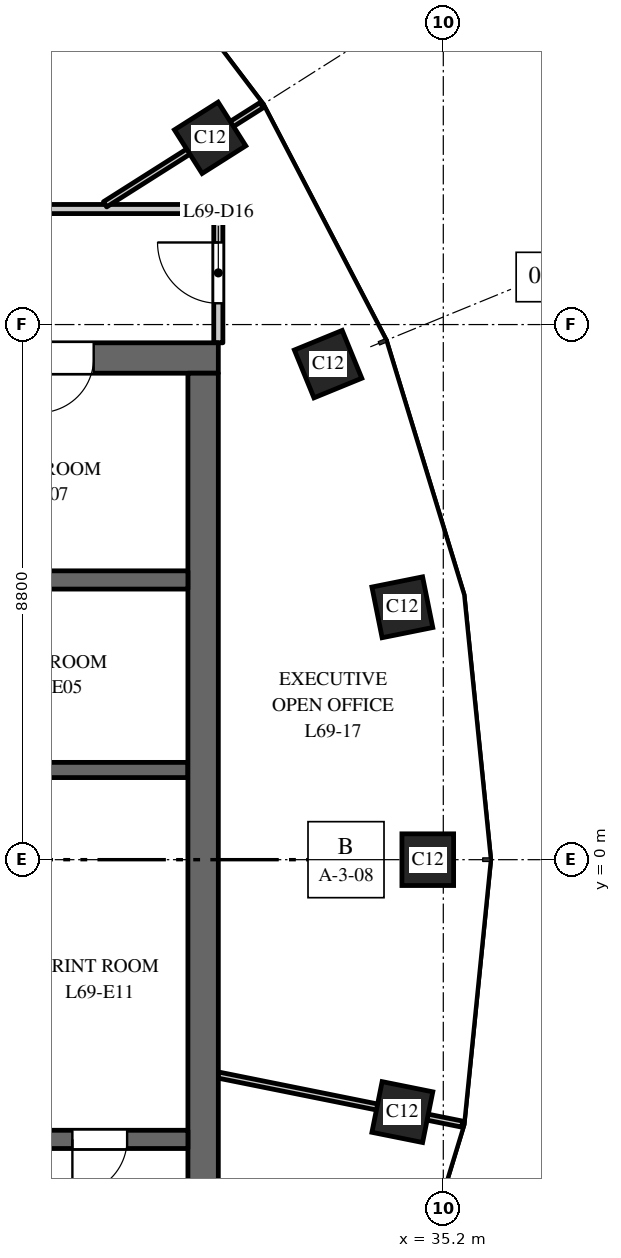
"""IFC4 building model, lengths in metres.
Left out: names, types, materials, properties, quantities, classifications, styles, units other than length and angle.
Written with IfcOpenShell. Run it as: python <this file> out.ifc"""

import sys

from ifc_helpers import new_model, si_unit, direction, frame, frame_2d, origin, origin_2d, place, context, subcontext, project, spatial, rectangle, extrude, element, fill, save


model = new_model("IFC4")
c1 = context("Model", 3, precision=1e-05, world=origin(), true_north=direction((0.0, 1.0)))
c2 = subcontext(c1, "Body", "Model", "MODEL_VIEW")
j1 = project(units=[si_unit("LENGTHUNIT", "METRE"), si_unit("PLANEANGLEUNIT", "RADIAN")], contexts=[c1])
p1 = place(None, origin())
s1 = spatial("IfcSite", under=j1, at=p1, CompositionType="ELEMENT")
p2 = place(p1, origin())
s2 = spatial("IfcBuilding", under=s1, at=p2, CompositionType="ELEMENT")
p3 = place(p2, frame((0.0, 0.0, 319.0)))
s3 = spatial("IfcBuildingStorey", under=s2, at=p3, CompositionType="ELEMENT", Elevation=319.0)
for number, where, z_axis, x_axis in (
    (1, (34.945, 0.0, 0.0), (0.0, 0.0, 1.0), (0.0, 1.0, 0.0)),
    (2, (34.527, 4.151, 0.0), (0.0, 0.0, 1.0), (-0.197, 0.98, 0.0)),
    (3, (33.305, 8.149, 0.0), (0.0, 0.0, 1.0), (-0.379, 0.925, 0.0)),
    (4, (31.365, 11.871, 0.0), (0.0, 0.0, 1.0), (-0.535, 0.845, 0.0)),
    (5, (34.527, -4.151, 0.0), (0.0, 0.0, 1.0), (0.197, 0.98, 0.0)),
):
    element("IfcColumn", number, at=place(p3, frame(where, z_axis=z_axis, x_axis=x_axis)), inside=s3, PredefinedType="COLUMN", context=c2, shape_type="SweptSolid", body=[
        extrude(rectangle(XDim=0.85, YDim=0.85, at=origin_2d()), origin(), (0.0, 0.0, 1.0), 4.0),
    ])
p4 = place(p3, frame((16.5, 8.25, 0.0), z_axis=(0.0, 0.0, 1.0), x_axis=(1.0, 0.0, 0.0)))
e6 = element("IfcWall", 6, at=p4, inside=s3, PredefinedType="SHEAR", context=c2, shape_type="SweptSolid", body=[
    extrude(rectangle(XDim=15.0, YDim=0.5, at=frame_2d((7.5, 0.0))), origin(), (0.0, 0.0, 1.0), 3.7),
])
p5 = place(p4, frame((6.9, 0.0, 0.0)))
e7 = element("IfcOpeningElement", 7, at=p5, cuts=e6, PredefinedType="OPENING", context=c2, shape_type="SweptSolid", body=[
    extrude(rectangle(XDim=1.2, YDim=2.1, at=frame_2d((0.6, 1.05))), frame((0.0, 0.26, 0.0), z_axis=(0.0, -1.0, 0.0), x_axis=(1.0, 0.0, 0.0)), (0.0, 0.0, 1.0), 0.52),
])
p6 = place(p4, frame((12.05, 0.0, 0.0)))
e8 = element("IfcOpeningElement", 8, at=p6, cuts=e6, PredefinedType="OPENING", context=c2, shape_type="SweptSolid", body=[
    extrude(rectangle(XDim=0.9, YDim=2.1, at=frame_2d((0.45, 1.05))), frame((0.0, 0.26, 0.0), z_axis=(0.0, -1.0, 0.0), x_axis=(1.0, 0.0, 0.0)), (0.0, 0.0, 1.0), 0.52),
])
p7 = place(p3, frame((27.8, 1.475, 0.0), z_axis=(0.0, 0.0, 1.0), x_axis=(1.0, 0.0, 0.0)))
e9 = element("IfcWall", 9, at=p7, inside=s3, PredefinedType="SHEAR", context=c2, shape_type="SweptSolid", body=[
    extrude(rectangle(XDim=3.2, YDim=0.25, at=frame_2d((1.6, 0.0))), origin(), (0.0, 0.0, 1.0), 3.7),
])
p8 = place(p3, frame((31.25, -8.0, 0.0), z_axis=(0.0, 0.0, 1.0), x_axis=(0.0, 1.0, 0.0)))
e10 = element("IfcWall", 10, at=p8, inside=s3, PredefinedType="SHEAR", context=c2, shape_type="SweptSolid", body=[
    extrude(rectangle(XDim=16.0, YDim=0.5, at=frame_2d((8.0, 0.0))), origin(), (0.0, 0.0, 1.0), 3.7),
])
p9 = place(p3, frame((24.9, 4.6, 0.0), z_axis=(0.0, 0.0, 1.0), x_axis=(1.0, 0.0, 0.0)))
e11 = element("IfcWall", 11, at=p9, inside=s3, PredefinedType="SHEAR", context=c2, shape_type="SweptSolid", body=[
    extrude(rectangle(XDim=6.1, YDim=0.3, at=frame_2d((3.05, 0.0))), origin(), (0.0, 0.0, 1.0), 3.7),
])
p10 = place(p3, frame((24.9, -4.6, 0.0), z_axis=(0.0, 0.0, 1.0), x_axis=(1.0, 0.0, 0.0)))
e12 = element("IfcWall", 12, at=p10, inside=s3, PredefinedType="SHEAR", context=c2, shape_type="SweptSolid", body=[
    extrude(rectangle(XDim=6.1, YDim=0.3, at=frame_2d((3.05, 0.0))), origin(), (0.0, 0.0, 1.0), 3.7),
])
p11 = place(p10, frame((4.2, 0.0, 0.0)))
e13 = element("IfcOpeningElement", 13, at=p11, cuts=e12, PredefinedType="OPENING", context=c2, shape_type="SweptSolid", body=[
    extrude(rectangle(XDim=0.9, YDim=2.1, at=frame_2d((0.45, 1.05))), frame((0.0, 0.16, 0.0), z_axis=(0.0, -1.0, 0.0), x_axis=(1.0, 0.0, 0.0)), (0.0, 0.0, 1.0), 0.32),
])
p12 = place(p3, frame((16.5, 10.7, 0.0), z_axis=(0.0, 0.0, 1.0), x_axis=(1.0, 0.0, 0.0)))
e14 = element("IfcWall", 14, at=p12, inside=s3, PredefinedType="PARTITIONING", context=c2, shape_type="SweptSolid", body=[
    extrude(rectangle(XDim=15.0, YDim=0.15, at=frame_2d((7.5, 0.0))), origin(), (0.0, 0.0, 1.0), 2.75),
])
p13 = place(p12, frame((2.975, 0.0, 0.0)))
e15 = element("IfcOpeningElement", 15, at=p13, cuts=e14, PredefinedType="OPENING", context=c2, shape_type="SweptSolid", body=[
    extrude(rectangle(XDim=1.0, YDim=2.1, at=frame_2d((0.5, 1.05))), frame((0.0, 0.085, 0.0), z_axis=(0.0, -1.0, 0.0), x_axis=(1.0, 0.0, 0.0)), (0.0, 0.0, 1.0), 0.17),
])
p14 = place(p12, frame((5.871, 0.0, 0.0)))
e16 = element("IfcOpeningElement", 16, at=p14, cuts=e14, PredefinedType="OPENING", context=c2, shape_type="SweptSolid", body=[
    extrude(rectangle(XDim=1.0, YDim=2.1, at=frame_2d((0.5, 1.05))), frame((0.0, 0.085, 0.0), z_axis=(0.0, -1.0, 0.0), x_axis=(1.0, 0.0, 0.0)), (0.0, 0.0, 1.0), 0.17),
])
p15 = place(p3, frame((29.637, 10.777, 0.0), z_axis=(0.0, 0.0, 1.0), x_axis=(0.844810627195, 0.535065420467, 0.0)))
e17 = element("IfcWall", 17, at=p15, inside=s3, PredefinedType="PARTITIONING", context=c2, shape_type="SweptSolid", body=[
    extrude(rectangle(XDim=3.048, YDim=0.1, at=frame_2d((1.524, 0.0))), origin(), (0.0, 0.0, 1.0), 3.0),
])
p16 = place(p3, frame((31.5, -3.542, 0.0), z_axis=(0.0, 0.0, 1.0), x_axis=(0.980357474535, -0.197228857227, 0.0)))
e18 = element("IfcWall", 18, at=p16, inside=s3, PredefinedType="PARTITIONING", context=c2, shape_type="SweptSolid", body=[
    extrude(rectangle(XDim=4.092, YDim=0.1, at=frame_2d((2.046, 0.0))), origin(), (0.0, 0.0, 1.0), 3.0),
])
p17 = place(p3, frame((31.5, 8.5, 0.0), z_axis=(0.0, 0.0, 1.0), x_axis=(0.0, 1.0, 0.0)))
e19 = element("IfcWall", 19, at=p17, inside=s3, PredefinedType="PARTITIONING", context=c2, shape_type="SweptSolid", body=[
    extrude(rectangle(XDim=2.2, YDim=0.15, at=frame_2d((1.1, 0.0))), origin(), (0.0, 0.0, 1.0), 3.0),
])
p18 = place(p17, frame((0.65, 0.0, 0.0)))
e20 = element("IfcOpeningElement", 20, at=p18, cuts=e19, PredefinedType="OPENING", context=c2, shape_type="SweptSolid", body=[
    extrude(rectangle(XDim=1.0, YDim=2.1, at=frame_2d((0.5, 1.05))), frame((0.0, 0.085, 0.0), z_axis=(0.0, -1.0, 0.0), x_axis=(1.0, 0.0, 0.0)), (0.0, 0.0, 1.0), 0.17),
])
p19 = place(p6, origin())
e21 = element("IfcDoor", 21, at=p19, inside=s3, OperationType="SINGLE_SWING_LEFT", PredefinedType="DOOR", context=c2, shape_type="SweptSolid", body=[
    extrude(rectangle(XDim=0.9, YDim=2.1, at=frame_2d((0.45, 1.05))), frame((0.0, 0.025, 0.0), z_axis=(0.0, -1.0, 0.0), x_axis=(1.0, 0.0, 0.0)), (0.0, 0.0, 1.0), 0.05),
])
fill(e8, e21)
p20 = place(p11, origin())
e22 = element("IfcDoor", 22, at=p20, inside=s3, OperationType="SINGLE_SWING_LEFT", PredefinedType="DOOR", context=c2, shape_type="SweptSolid", body=[
    extrude(rectangle(XDim=0.9, YDim=2.1, at=frame_2d((0.45, 1.05))), frame((0.0, 0.025, 0.0), z_axis=(0.0, -1.0, 0.0), x_axis=(1.0, 0.0, 0.0)), (0.0, 0.0, 1.0), 0.05),
])
fill(e13, e22)
p21 = place(p18, origin())
e23 = element("IfcDoor", 23, at=p21, inside=s3, OperationType="SINGLE_SWING_RIGHT", PredefinedType="DOOR", context=c2, shape_type="SweptSolid", body=[
    extrude(rectangle(XDim=1.0, YDim=2.1, at=frame_2d((0.5, 1.05))), frame((0.0, 0.025, 0.0), z_axis=(0.0, -1.0, 0.0), x_axis=(1.0, 0.0, 0.0)), (0.0, 0.0, 1.0), 0.05),
])
fill(e20, e23)
save(model, sys.argv[1])
